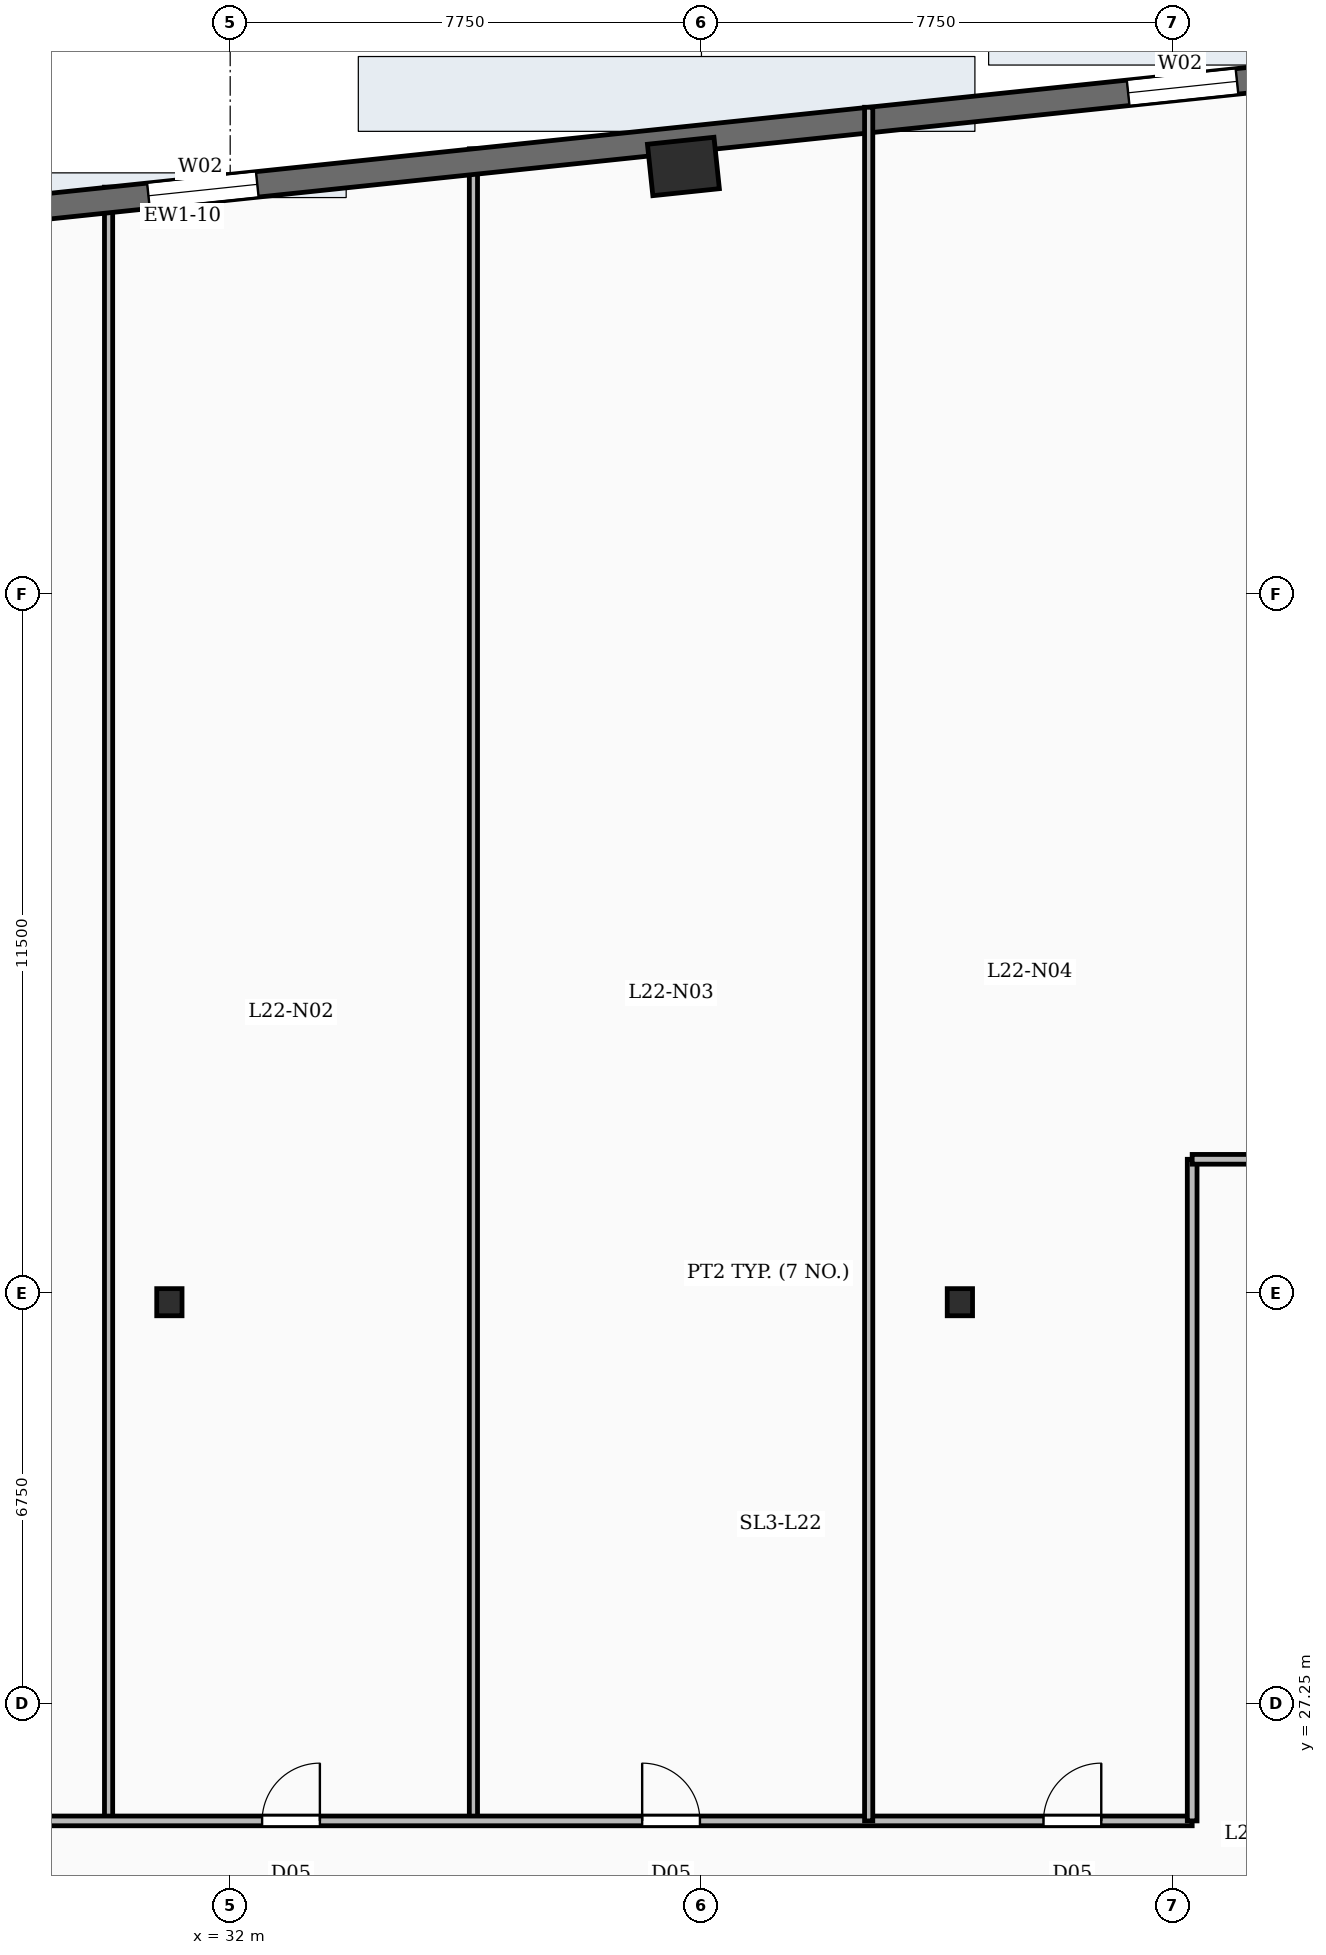
"""IFC4 building model, lengths in metres.
Left out: names, types, materials, properties, quantities, classifications, styles, units other than length and angle.
Written with IfcOpenShell. Run it as: python <this file> out.ifc"""

import sys

from ifc_helpers import new_model, si_unit, direction, frame, frame_2d, origin, origin_2d, place, context, subcontext, project, spatial, rectangle, i_section, extrude, element, fill, save


model = new_model("IFC4")
c1 = context("Model", 3, precision=1e-05, world=origin(), true_north=direction((0.0, 1.0)))
c2 = subcontext(c1, "Body", "Model", "MODEL_VIEW")
j1 = project(units=[si_unit("LENGTHUNIT", "METRE"), si_unit("PLANEANGLEUNIT", "RADIAN")], contexts=[c1])
p1 = place(None, origin())
s1 = spatial("IfcSite", under=j1, at=p1, CompositionType="ELEMENT")
p2 = place(p1, origin())
s2 = spatial("IfcBuilding", under=s1, at=p2, CompositionType="ELEMENT")
p3 = place(p2, frame((0.0, 0.0, 99.7)))
s3 = spatial("IfcBuildingStorey", under=s2, at=p3, CompositionType="ELEMENT", Elevation=99.7)
for number, where, z_axis, x_axis in (
    (1, (31.0, 33.85, -0.45), (0.0, 0.0, 1.0), (1.0, 0.0, 0.0)),
    (2, (44.0, 33.85, -0.45), (0.0, 0.0, 1.0), (1.0, 0.0, 0.0)),
):
    element("IfcColumn", number, at=place(p3, frame(where, z_axis=z_axis, x_axis=x_axis)), inside=s3, PredefinedType="COLUMN", context=c2, shape_type="SweptSolid", body=[
        extrude(i_section(OverallWidth=0.416, OverallDepth=0.446, WebThickness=0.039, FlangeThickness=0.063, FilletRadius=0.02, at=origin_2d()), origin(), (0.0, 0.0, 1.0), 3.93),
    ])
p4 = place(p3, frame((39.453, 52.527, -0.45), z_axis=(0.0, 0.0, 1.0), x_axis=(0.994521895368, 0.104528463268, 0.0)))
e3 = element("IfcColumn", 3, at=p4, inside=s3, PredefinedType="COLUMN", context=c2, shape_type="SweptSolid", body=[
    extrude(rectangle(XDim=1.1, YDim=0.85, at=origin_2d()), origin(), (0.0, 0.0, 1.0), 3.93),
])
p5 = place(p3, frame((11.958, 50.08, 0.0), z_axis=(0.0, 0.0, 1.0), x_axis=(0.994521823388, 0.104529148113, 0.0)))
e4 = element("IfcWall", 4, at=p5, inside=s3, PredefinedType="SOLIDWALL", context=c2, shape_type="SweptSolid", body=[
    extrude(rectangle(XDim=55.2, YDim=0.42, at=frame_2d((27.6, 0.0))), origin(), (0.0, 0.0, 1.0), 3.48),
])
p6 = place(p5, frame((2.6, 0.0, 0.88)))
e5 = element("IfcOpeningElement", 5, at=p6, cuts=e4, PredefinedType="OPENING", context=c2, shape_type="SweptSolid", body=[
    extrude(rectangle(XDim=1.8, YDim=2.15, at=frame_2d((0.9, 1.075))), frame((0.0, 0.22, 0.0), z_axis=(0.0, -1.0, 0.0), x_axis=(1.0, 0.0, 0.0)), (0.0, 0.0, 1.0), 0.44),
])
p7 = place(p5, frame((8.0, 0.0, 0.88)))
e6 = element("IfcOpeningElement", 6, at=p7, cuts=e4, PredefinedType="OPENING", context=c2, shape_type="SweptSolid", body=[
    extrude(rectangle(XDim=1.8, YDim=2.15, at=frame_2d((0.9, 1.075))), frame((0.0, 0.22, 0.0), z_axis=(0.0, -1.0, 0.0), x_axis=(1.0, 0.0, 0.0)), (0.0, 0.0, 1.0), 0.44),
])
p8 = place(p5, frame((18.8, 0.0, 0.88)))
e7 = element("IfcOpeningElement", 7, at=p8, cuts=e4, PredefinedType="OPENING", context=c2, shape_type="SweptSolid", body=[
    extrude(rectangle(XDim=1.8, YDim=2.15, at=frame_2d((0.9, 1.075))), frame((0.0, 0.22, 0.0), z_axis=(0.0, -1.0, 0.0), x_axis=(1.0, 0.0, 0.0)), (0.0, 0.0, 1.0), 0.44),
])
p9 = place(p5, frame((35.0, 0.0, 0.88)))
e8 = element("IfcOpeningElement", 8, at=p9, cuts=e4, PredefinedType="OPENING", context=c2, shape_type="SweptSolid", body=[
    extrude(rectangle(XDim=1.8, YDim=2.15, at=frame_2d((0.9, 1.075))), frame((0.0, 0.22, 0.0), z_axis=(0.0, -1.0, 0.0), x_axis=(1.0, 0.0, 0.0)), (0.0, 0.0, 1.0), 0.44),
])
p10 = place(p5, frame((45.8, 0.0, 0.88)))
e9 = element("IfcOpeningElement", 9, at=p10, cuts=e4, PredefinedType="OPENING", context=c2, shape_type="SweptSolid", body=[
    extrude(rectangle(XDim=1.8, YDim=2.15, at=frame_2d((0.9, 1.075))), frame((0.0, 0.22, 0.0), z_axis=(0.0, -1.0, 0.0), x_axis=(1.0, 0.0, 0.0)), (0.0, 0.0, 1.0), 0.44),
])
p11 = place(p3, frame((30.0, 25.32, 0.0), z_axis=(0.0, 0.0, 1.0), x_axis=(0.0, 1.0, 0.0)))
e10 = element("IfcWall", 10, at=p11, inside=s3, PredefinedType="PARTITIONING", context=c2, shape_type="SweptSolid", body=[
    extrude(rectangle(XDim=26.867, YDim=0.135, at=frame_2d((13.434, 0.0))), origin(), (0.0, 0.0, 1.0), 2.54),
])
p12 = place(p3, frame((36.0, 25.32, 0.0), z_axis=(0.0, 0.0, 1.0), x_axis=(0.0, 1.0, 0.0)))
e11 = element("IfcWall", 11, at=p12, inside=s3, PredefinedType="PARTITIONING", context=c2, shape_type="SweptSolid", body=[
    extrude(rectangle(XDim=27.498, YDim=0.135, at=frame_2d((13.749, 0.0))), origin(), (0.0, 0.0, 1.0), 2.54),
])
p13 = place(p3, frame((42.5, 25.32, 0.0), z_axis=(0.0, 0.0, 1.0), x_axis=(0.0, 1.0, 0.0)))
e12 = element("IfcWall", 12, at=p13, inside=s3, PredefinedType="PARTITIONING", context=c2, shape_type="SweptSolid", body=[
    extrude(rectangle(XDim=28.181, YDim=0.135, at=frame_2d((14.09, 0.0))), origin(), (0.0, 0.0, 1.0), 2.54),
])
p14 = place(p3, frame((27.08, 25.32, 0.0), z_axis=(0.0, 0.0, 1.0), x_axis=(1.0, 0.0, 0.0)))
e13 = element("IfcWall", 13, at=p14, inside=s3, PredefinedType="PARTITIONING", context=c2, shape_type="SweptSolid", body=[
    extrude(rectangle(XDim=20.74, YDim=0.16, at=frame_2d((10.37, 0.0))), origin(), (0.0, 0.0, 1.0), 2.54),
])
p15 = place(p14, frame((0.995, 0.0, 0.0)))
e14 = element("IfcOpeningElement", 14, at=p15, cuts=e13, PredefinedType="OPENING", context=c2, shape_type="SweptSolid", body=[
    extrude(rectangle(XDim=0.95, YDim=2.15, at=frame_2d((0.475, 1.075))), frame((0.0, 0.09, 0.0), z_axis=(0.0, -1.0, 0.0), x_axis=(1.0, 0.0, 0.0)), (0.0, 0.0, 1.0), 0.18),
])
p16 = place(p14, frame((5.445, 0.0, 0.0)))
e15 = element("IfcOpeningElement", 15, at=p16, cuts=e13, PredefinedType="OPENING", context=c2, shape_type="SweptSolid", body=[
    extrude(rectangle(XDim=0.95, YDim=2.15, at=frame_2d((0.475, 1.075))), frame((0.0, 0.09, 0.0), z_axis=(0.0, -1.0, 0.0), x_axis=(1.0, 0.0, 0.0)), (0.0, 0.0, 1.0), 0.18),
])
p17 = place(p14, frame((11.695, 0.0, 0.0)))
e16 = element("IfcOpeningElement", 16, at=p17, cuts=e13, PredefinedType="OPENING", context=c2, shape_type="SweptSolid", body=[
    extrude(rectangle(XDim=0.95, YDim=2.15, at=frame_2d((0.475, 1.075))), frame((0.0, 0.09, 0.0), z_axis=(0.0, -1.0, 0.0), x_axis=(1.0, 0.0, 0.0)), (0.0, 0.0, 1.0), 0.18),
])
p18 = place(p14, frame((18.295, 0.0, 0.0)))
e17 = element("IfcOpeningElement", 17, at=p18, cuts=e13, PredefinedType="OPENING", context=c2, shape_type="SweptSolid", body=[
    extrude(rectangle(XDim=0.95, YDim=2.15, at=frame_2d((0.475, 1.075))), frame((0.0, 0.09, 0.0), z_axis=(0.0, -1.0, 0.0), x_axis=(1.0, 0.0, 0.0)), (0.0, 0.0, 1.0), 0.18),
])
p19 = place(p3, frame((47.82, 25.32, 0.0), z_axis=(0.0, 0.0, 1.0), x_axis=(0.0, 1.0, 0.0)))
e18 = element("IfcWall", 18, at=p19, inside=s3, PredefinedType="PARTITIONING", context=c2, shape_type="SweptSolid", body=[
    extrude(rectangle(XDim=10.88, YDim=0.16, at=frame_2d((5.44, 0.0))), origin(), (0.0, 0.0, 1.0), 2.54),
])
p20 = place(p3, frame((47.82, 36.2, 0.0), z_axis=(0.0, 0.0, 1.0), x_axis=(1.0, 0.0, 0.0)))
e19 = element("IfcWall", 19, at=p20, inside=s3, PredefinedType="PARTITIONING", context=c2, shape_type="SweptSolid", body=[
    extrude(rectangle(XDim=2.26, YDim=0.16, at=frame_2d((1.13, 0.0))), origin(), (0.0, 0.0, 1.0), 2.54),
])
p21 = place(p8, origin())
e20 = element("IfcWindow", 20, at=p21, inside=s3, PartitioningType="DOUBLE_PANEL_VERTICAL", PredefinedType="WINDOW", context=c2, shape_type="SweptSolid", body=[
    extrude(rectangle(XDim=1.8, YDim=2.15, at=frame_2d((0.9, 1.075))), frame((0.0, 0.03, 0.0), z_axis=(0.0, -1.0, 0.0), x_axis=(1.0, 0.0, 0.0)), (0.0, 0.0, 1.0), 0.06),
])
fill(e7, e20)
p22 = place(p9, origin())
e21 = element("IfcWindow", 21, at=p22, inside=s3, PartitioningType="DOUBLE_PANEL_VERTICAL", PredefinedType="WINDOW", context=c2, shape_type="SweptSolid", body=[
    extrude(rectangle(XDim=1.8, YDim=2.15, at=frame_2d((0.9, 1.075))), frame((0.0, 0.03, 0.0), z_axis=(0.0, -1.0, 0.0), x_axis=(1.0, 0.0, 0.0)), (0.0, 0.0, 1.0), 0.06),
])
fill(e8, e21)
p23 = place(p16, origin())
e22 = element("IfcDoor", 22, at=p23, inside=s3, OperationType="SINGLE_SWING_RIGHT", PredefinedType="DOOR", context=c2, shape_type="SweptSolid", body=[
    extrude(rectangle(XDim=0.95, YDim=2.15, at=frame_2d((0.475, 1.075))), frame((0.0, 0.025, 0.0), z_axis=(0.0, -1.0, 0.0), x_axis=(1.0, 0.0, 0.0)), (0.0, 0.0, 1.0), 0.05),
])
fill(e15, e22)
p24 = place(p17, origin())
e23 = element("IfcDoor", 23, at=p24, inside=s3, OperationType="SINGLE_SWING_LEFT", PredefinedType="DOOR", context=c2, shape_type="SweptSolid", body=[
    extrude(rectangle(XDim=0.95, YDim=2.15, at=frame_2d((0.475, 1.075))), frame((0.0, 0.025, 0.0), z_axis=(0.0, -1.0, 0.0), x_axis=(1.0, 0.0, 0.0)), (0.0, 0.0, 1.0), 0.05),
])
fill(e16, e23)
p25 = place(p18, origin())
e24 = element("IfcDoor", 24, at=p25, inside=s3, OperationType="SINGLE_SWING_RIGHT", PredefinedType="DOOR", context=c2, shape_type="SweptSolid", body=[
    extrude(rectangle(XDim=0.95, YDim=2.15, at=frame_2d((0.475, 1.075))), frame((0.0, 0.025, 0.0), z_axis=(0.0, -1.0, 0.0), x_axis=(1.0, 0.0, 0.0)), (0.0, 0.0, 1.0), 0.05),
])
fill(e17, e24)
save(model, sys.argv[1])
